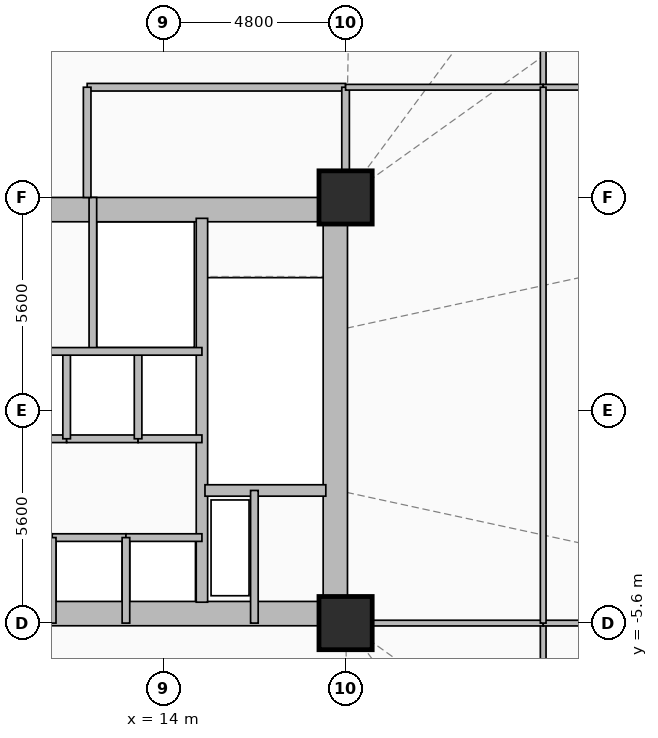
"""IFC4 building model, lengths in metres.
Left out: names, types, materials, properties, quantities, classifications, styles, units other than length and angle.
Written with IfcOpenShell. Run it as: python <this file> out.ifc"""

import sys

from ifc_helpers import new_model, si_unit, direction, frame, frame_2d, origin, origin_2d, place, context, subcontext, project, spatial, rectangle, extrude, element, fill, save


model = new_model("IFC4")
c1 = context("Model", 3, precision=1e-05, world=origin(), true_north=direction((0.0, 1.0)))
c2 = subcontext(c1, "Body", "Model", "MODEL_VIEW")
j1 = project(units=[si_unit("LENGTHUNIT", "METRE"), si_unit("PLANEANGLEUNIT", "RADIAN")], contexts=[c1])
p1 = place(None, origin())
s1 = spatial("IfcSite", under=j1, at=p1, CompositionType="ELEMENT")
p2 = place(p1, origin())
s2 = spatial("IfcBuilding", under=s1, at=p2, CompositionType="ELEMENT")
p3 = place(p2, frame((0.0, 0.0, 22.5)))
s3 = spatial("IfcBuildingStorey", under=s2, at=p3, CompositionType="ELEMENT", Elevation=22.5)
for number, where, z_axis, x_axis in (
    (1, (18.8, -5.6, 0.0), (0.0, 0.0, 1.0), (1.0, 0.0, 0.0)),
    (2, (18.8, 5.6, 0.0), (0.0, 0.0, 1.0), (1.0, 0.0, 0.0)),
):
    element("IfcColumn", number, at=place(p3, frame(where, z_axis=z_axis, x_axis=x_axis)), inside=s3, PredefinedType="COLUMN", context=c2, shape_type="SweptSolid", body=[
        extrude(rectangle(XDim=1.4, YDim=1.4, at=origin_2d()), origin(), (0.0, 0.0, 1.0), 4.5),
    ])
p4 = place(p3, frame((9.2, 5.28, 0.0), z_axis=(0.0, 0.0, 1.0), x_axis=(1.0, 0.0, 0.0)))
e3 = element("IfcWall", 3, at=p4, inside=s3, PredefinedType="SHEAR", context=c2, shape_type="SweptSolid", body=[
    extrude(rectangle(XDim=9.6, YDim=0.64, at=frame_2d((4.8, 0.0))), origin(), (0.0, 0.0, 1.0), 4.16),
])
p5 = place(p4, frame((6.95, 0.0, 0.0)))
e4 = element("IfcOpeningElement", 4, at=p5, cuts=e3, PredefinedType="OPENING", context=c2, shape_type="SweptSolid", body=[
    extrude(rectangle(XDim=1.1, YDim=2.15, at=frame_2d((0.55, 1.075))), frame((0.0, 0.33, 0.0), z_axis=(0.0, -1.0, 0.0), x_axis=(1.0, 0.0, 0.0)), (0.0, 0.0, 1.0), 0.66),
])
p6 = place(p4, frame((3.775, 0.0, 0.0)))
e5 = element("IfcOpeningElement", 5, at=p6, cuts=e3, PredefinedType="OPENING", context=c2, shape_type="SweptSolid", body=[
    extrude(rectangle(XDim=1.05, YDim=2.1, at=frame_2d((0.525, 1.05))), frame((0.0, 0.33, 0.0), z_axis=(0.0, -1.0, 0.0), x_axis=(1.0, 0.0, 0.0)), (0.0, 0.0, 1.0), 0.66),
])
p7 = place(p3, frame((9.2, -5.35, 0.0), z_axis=(0.0, 0.0, 1.0), x_axis=(1.0, 0.0, 0.0)))
e6 = element("IfcWall", 6, at=p7, inside=s3, PredefinedType="SHEAR", context=c2, shape_type="SweptSolid", body=[
    extrude(rectangle(XDim=9.6, YDim=0.64, at=frame_2d((4.8, 0.0))), origin(), (0.0, 0.0, 1.0), 4.16),
])
p8 = place(p7, frame((7.65, 0.0, 0.0)))
e7 = element("IfcOpeningElement", 7, at=p8, cuts=e6, PredefinedType="OPENING", context=c2, shape_type="SweptSolid", body=[
    extrude(rectangle(XDim=0.9, YDim=2.1, at=frame_2d((0.45, 1.05))), frame((0.0, 0.33, 0.0), z_axis=(0.0, -1.0, 0.0), x_axis=(1.0, 0.0, 0.0)), (0.0, 0.0, 1.0), 0.66),
])
p9 = place(p3, frame((18.53, -5.05, 0.0), z_axis=(0.0, 0.0, 1.0), x_axis=(0.0, 1.0, 0.0)))
e8 = element("IfcWall", 8, at=p9, inside=s3, PredefinedType="SHEAR", context=c2, shape_type="SweptSolid", body=[
    extrude(rectangle(XDim=10.1, YDim=0.64, at=frame_2d((5.05, 0.0))), origin(), (0.0, 0.0, 1.0), 4.16),
])
p10 = place(p3, frame((15.02, -5.05, 0.0), z_axis=(0.0, 0.0, 1.0), x_axis=(0.0, 1.0, 0.0)))
e9 = element("IfcWall", 9, at=p10, inside=s3, PredefinedType="SHEAR", context=c2, shape_type="SweptSolid", body=[
    extrude(rectangle(XDim=10.1, YDim=0.3, at=frame_2d((5.05, 0.0))), origin(), (0.0, 0.0, 1.0), 4.16),
])
p11 = place(p3, frame((15.1, -2.11, 0.0), z_axis=(0.0, 0.0, 1.0), x_axis=(1.0, 0.0, 0.0)))
e10 = element("IfcWall", 10, at=p11, inside=s3, PredefinedType="SHEAR", context=c2, shape_type="SweptSolid", body=[
    extrude(rectangle(XDim=3.18, YDim=0.3, at=frame_2d((1.59, 0.0))), origin(), (0.0, 0.0, 1.0), 4.16),
])
p12 = place(p3, frame((16.4, -2.11, 0.0), z_axis=(0.0, 0.0, 1.0), x_axis=(0.0, -1.0, 0.0)))
e11 = element("IfcWall", 11, at=p12, inside=s3, PredefinedType="PARTITIONING", context=c2, shape_type="SweptSolid", body=[
    extrude(rectangle(XDim=3.49, YDim=0.2, at=frame_2d((1.745, 0.0))), origin(), (0.0, 0.0, 1.0), 4.16),
])
p13 = place(p3, frame((12.15, 5.6, 0.0), z_axis=(0.0, 0.0, 1.0), x_axis=(0.0, -1.0, 0.0)))
e12 = element("IfcWall", 12, at=p13, inside=s3, PredefinedType="PARTITIONING", context=c2, shape_type="SweptSolid", body=[
    extrude(rectangle(XDim=4.05, YDim=0.2, at=frame_2d((2.025, 0.0))), origin(), (0.0, 0.0, 1.0), 4.16),
])
p14 = place(p3, frame((18.8, 8.5, 0.0), z_axis=(0.0, 0.0, 1.0), x_axis=(-1.0, 0.0, 0.0)))
e13 = element("IfcWall", 13, at=p14, inside=s3, PredefinedType="PARTITIONING", context=c2, shape_type="SweptSolid", body=[
    extrude(rectangle(XDim=6.8, YDim=0.2, at=frame_2d((3.4, 0.0))), origin(), (0.0, 0.0, 1.0), 4.16),
])
p15 = place(p14, frame((3.985, 0.0, 0.0)))
e14 = element("IfcOpeningElement", 14, at=p15, cuts=e13, PredefinedType="OPENING", context=c2, shape_type="SweptSolid", body=[
    extrude(rectangle(XDim=1.1, YDim=2.15, at=frame_2d((0.55, 1.075))), frame((0.0, 0.11, 0.0), z_axis=(0.0, -1.0, 0.0), x_axis=(1.0, 0.0, 0.0)), (0.0, 0.0, 1.0), 0.22),
])
p16 = place(p3, frame((12.0, 8.5, 0.0), z_axis=(0.0, 0.0, 1.0), x_axis=(0.0, -1.0, 0.0)))
e15 = element("IfcWall", 15, at=p16, inside=s3, PredefinedType="PARTITIONING", context=c2, shape_type="SweptSolid", body=[
    extrude(rectangle(XDim=2.9, YDim=0.2, at=frame_2d((1.45, 0.0))), origin(), (0.0, 0.0, 1.0), 4.16),
])
p17 = place(p3, frame((18.8, 5.6, 0.0), z_axis=(0.0, 0.0, 1.0), x_axis=(0.0, 1.0, 0.0)))
e16 = element("IfcWall", 16, at=p17, inside=s3, PredefinedType="PARTITIONING", context=c2, shape_type="SweptSolid", body=[
    extrude(rectangle(XDim=2.9, YDim=0.2, at=frame_2d((1.45, 0.0))), origin(), (0.0, 0.0, 1.0), 3.645),
])
p18 = place(p3, frame((9.2, -3.35, 0.0), z_axis=(0.0, 0.0, 1.0), x_axis=(1.0, 0.0, 0.0)))
e17 = element("IfcWall", 17, at=p18, inside=s3, PredefinedType="PARTITIONING", context=c2, shape_type="SweptSolid", body=[
    extrude(rectangle(XDim=1.88, YDim=0.2, at=frame_2d((0.94, 0.0))), origin(), (0.0, 0.0, 1.0), 3.875),
])
p19 = place(p3, frame((11.08, -3.35, 0.0), z_axis=(0.0, 0.0, 1.0), x_axis=(1.0, 0.0, 0.0)))
e18 = element("IfcWall", 18, at=p19, inside=s3, PredefinedType="PARTITIONING", context=c2, shape_type="SweptSolid", body=[
    extrude(rectangle(XDim=1.94, YDim=0.2, at=frame_2d((0.97, 0.0))), origin(), (0.0, 0.0, 1.0), 4.16),
])
p20 = place(p3, frame((13.02, -3.35, 0.0), z_axis=(0.0, 0.0, 1.0), x_axis=(1.0, 0.0, 0.0)))
e19 = element("IfcWall", 19, at=p20, inside=s3, PredefinedType="PARTITIONING", context=c2, shape_type="SweptSolid", body=[
    extrude(rectangle(XDim=2.0, YDim=0.2, at=frame_2d((1.0, 0.0))), origin(), (0.0, 0.0, 1.0), 4.16),
])
p21 = place(p3, frame((11.46, -0.75, 0.0), z_axis=(0.0, 0.0, 1.0), x_axis=(-1.0, 0.0, 0.0)))
e20 = element("IfcWall", 20, at=p21, inside=s3, PredefinedType="PARTITIONING", context=c2, shape_type="SweptSolid", body=[
    extrude(rectangle(XDim=2.26, YDim=0.2, at=frame_2d((1.13, 0.0))), origin(), (0.0, 0.0, 1.0), 4.16),
])
p22 = place(p21, frame((0.605, 0.0, 0.0)))
e21 = element("IfcOpeningElement", 21, at=p22, cuts=e20, PredefinedType="OPENING", context=c2, shape_type="SweptSolid", body=[
    extrude(rectangle(XDim=1.05, YDim=2.1, at=frame_2d((0.525, 1.05))), frame((0.0, 0.11, 0.0), z_axis=(0.0, -1.0, 0.0), x_axis=(1.0, 0.0, 0.0)), (0.0, 0.0, 1.0), 0.22),
])
p23 = place(p3, frame((13.34, -0.75, 0.0), z_axis=(0.0, 0.0, 1.0), x_axis=(-1.0, 0.0, 0.0)))
e22 = element("IfcWall", 22, at=p23, inside=s3, PredefinedType="PARTITIONING", context=c2, shape_type="SweptSolid", body=[
    extrude(rectangle(XDim=1.88, YDim=0.2, at=frame_2d((0.94, 0.0))), origin(), (0.0, 0.0, 1.0), 4.16),
])
p24 = place(p23, frame((0.415, 0.0, 0.0)))
e23 = element("IfcOpeningElement", 23, at=p24, cuts=e22, PredefinedType="OPENING", context=c2, shape_type="SweptSolid", body=[
    extrude(rectangle(XDim=1.05, YDim=2.1, at=frame_2d((0.525, 1.05))), frame((0.0, 0.11, 0.0), z_axis=(0.0, -1.0, 0.0), x_axis=(1.0, 0.0, 0.0)), (0.0, 0.0, 1.0), 0.22),
])
p25 = place(p3, frame((15.02, -0.75, 0.0), z_axis=(0.0, 0.0, 1.0), x_axis=(-1.0, 0.0, 0.0)))
e24 = element("IfcWall", 24, at=p25, inside=s3, PredefinedType="PARTITIONING", context=c2, shape_type="SweptSolid", body=[
    extrude(rectangle(XDim=1.68, YDim=0.2, at=frame_2d((0.84, 0.0))), origin(), (0.0, 0.0, 1.0), 4.16),
])
for number, where, z_axis, x_axis in (
    (25, (11.08, -5.6, 0.0), (0.0, 0.0, 1.0), (0.0, 1.0, 0.0)),
    (26, (13.02, -5.6, 0.0), (0.0, 0.0, 1.0), (0.0, 1.0, 0.0)),
):
    element("IfcWall", number, at=place(p3, frame(where, z_axis=z_axis, x_axis=x_axis)), inside=s3, PredefinedType="PARTITIONING", context=c2, shape_type="SweptSolid", body=[
        extrude(rectangle(XDim=2.25, YDim=0.2, at=frame_2d((1.125, 0.0))), origin(), (0.0, 0.0, 1.0), 4.16),
    ])
for number, where, z_axis, x_axis in (
    (27, (11.46, -0.75, 0.0), (0.0, 0.0, 1.0), (0.0, 1.0, 0.0)),
    (28, (13.34, -0.75, 0.0), (0.0, 0.0, 1.0), (0.0, 1.0, 0.0)),
):
    element("IfcWall", number, at=place(p3, frame(where, z_axis=z_axis, x_axis=x_axis)), inside=s3, PredefinedType="PARTITIONING", context=c2, shape_type="SweptSolid", body=[
        extrude(rectangle(XDim=2.3, YDim=0.2, at=frame_2d((1.15, 0.0))), origin(), (0.0, 0.0, 1.0), 4.16),
    ])
p26 = place(p3, frame((24.0, 10.65, 0.0), z_axis=(0.0, 0.0, 1.0), x_axis=(0.0, -1.0, 0.0)))
e29 = element("IfcWall", 29, at=p26, inside=s3, PredefinedType="PARTITIONING", context=c2, shape_type="SweptSolid", body=[
    extrude(rectangle(XDim=2.15, YDim=0.15, at=frame_2d((1.075, 0.0))), origin(), (0.0, 0.0, 1.0), 4.16),
])
p27 = place(p26, frame((0.625, 0.0, 0.0)))
e30 = element("IfcOpeningElement", 30, at=p27, cuts=e29, PredefinedType="OPENING", context=c2, shape_type="SweptSolid", body=[
    extrude(rectangle(XDim=0.9, YDim=2.1, at=frame_2d((0.45, 1.05))), frame((0.0, 0.085, 0.0), z_axis=(0.0, -1.0, 0.0), x_axis=(1.0, 0.0, 0.0)), (0.0, 0.0, 1.0), 0.17),
])
p28 = place(p3, frame((24.0, 8.5, 0.0), z_axis=(0.0, 0.0, 1.0), x_axis=(-1.0, 0.0, 0.0)))
e31 = element("IfcWall", 31, at=p28, inside=s3, PredefinedType="PARTITIONING", context=c2, shape_type="SweptSolid", body=[
    extrude(rectangle(XDim=5.2, YDim=0.15, at=frame_2d((2.6, 0.0))), origin(), (0.0, 0.0, 1.0), 4.16),
])
p29 = place(p28, frame((0.954, 0.0, 0.0)))
e32 = element("IfcOpeningElement", 32, at=p29, cuts=e31, PredefinedType="OPENING", context=c2, shape_type="SweptSolid", body=[
    extrude(rectangle(XDim=1.05, YDim=2.15, at=frame_2d((0.525, 1.075))), frame((0.0, 0.085, 0.0), z_axis=(0.0, -1.0, 0.0), x_axis=(1.0, 0.0, 0.0)), (0.0, 0.0, 1.0), 0.17),
])
p30 = place(p3, frame((24.0, -5.6, 0.0), z_axis=(0.0, 0.0, 1.0), x_axis=(0.0, -1.0, 0.0)))
e33 = element("IfcWall", 33, at=p30, inside=s3, PredefinedType="PARTITIONING", context=c2, shape_type="SweptSolid", body=[
    extrude(rectangle(XDim=2.15, YDim=0.15, at=frame_2d((1.075, 0.0))), origin(), (0.0, 0.0, 1.0), 4.16),
])
p31 = place(p30, frame((0.625, 0.0, 0.0)))
e34 = element("IfcOpeningElement", 34, at=p31, cuts=e33, PredefinedType="OPENING", context=c2, shape_type="SweptSolid", body=[
    extrude(rectangle(XDim=0.9, YDim=2.1, at=frame_2d((0.45, 1.05))), frame((0.0, 0.085, 0.0), z_axis=(0.0, -1.0, 0.0), x_axis=(1.0, 0.0, 0.0)), (0.0, 0.0, 1.0), 0.17),
])
p32 = place(p3, frame((18.8, -5.6, 0.0), z_axis=(0.0, 0.0, 1.0), x_axis=(1.0, 0.0, 0.0)))
e35 = element("IfcWall", 35, at=p32, inside=s3, PredefinedType="PARTITIONING", context=c2, shape_type="SweptSolid", body=[
    extrude(rectangle(XDim=5.2, YDim=0.15, at=frame_2d((2.6, 0.0))), origin(), (0.0, 0.0, 1.0), 4.16),
])
p33 = place(p3, frame((24.0, 8.5, 0.0), z_axis=(0.0, 0.0, 1.0), x_axis=(1.0, 0.0, 0.0)))
e36 = element("IfcWall", 36, at=p33, inside=s3, PredefinedType="PARTITIONING", context=c2, shape_type="SweptSolid", body=[
    extrude(rectangle(XDim=2.65, YDim=0.15, at=frame_2d((1.325, 0.0))), origin(), (0.0, 0.0, 1.0), 4.16),
])
p34 = place(p33, frame((0.965, 0.0, 0.0)))
e37 = element("IfcOpeningElement", 37, at=p34, cuts=e36, PredefinedType="OPENING", context=c2, shape_type="SweptSolid", body=[
    extrude(rectangle(XDim=1.05, YDim=2.15, at=frame_2d((0.525, 1.075))), frame((0.0, 0.085, 0.0), z_axis=(0.0, -1.0, 0.0), x_axis=(1.0, 0.0, 0.0)), (0.0, 0.0, 1.0), 0.17),
])
p35 = place(p3, frame((26.65, -5.6, 0.0), z_axis=(0.0, 0.0, 1.0), x_axis=(-1.0, 0.0, 0.0)))
e38 = element("IfcWall", 38, at=p35, inside=s3, PredefinedType="PARTITIONING", context=c2, shape_type="SweptSolid", body=[
    extrude(rectangle(XDim=2.65, YDim=0.15, at=frame_2d((1.325, 0.0))), origin(), (0.0, 0.0, 1.0), 4.16),
])
p36 = place(p35, frame((0.635, 0.0, 0.0)))
e39 = element("IfcOpeningElement", 39, at=p36, cuts=e38, PredefinedType="OPENING", context=c2, shape_type="SweptSolid", body=[
    extrude(rectangle(XDim=1.05, YDim=2.15, at=frame_2d((0.525, 1.075))), frame((0.0, 0.085, 0.0), z_axis=(0.0, -1.0, 0.0), x_axis=(1.0, 0.0, 0.0)), (0.0, 0.0, 1.0), 0.17),
])
p37 = place(p3, frame((24.0, -5.6, 0.0), z_axis=(0.0, 0.0, 1.0), x_axis=(0.0, 1.0, 0.0)))
e40 = element("IfcWall", 40, at=p37, inside=s3, PredefinedType="PARTITIONING", context=c2, shape_type="SweptSolid", body=[
    extrude(rectangle(XDim=14.1, YDim=0.15, at=frame_2d((7.05, 0.0))), origin(), (0.0, 0.0, 1.0), 4.16),
])
p38 = place(p3, frame((9.2, 1.55, 0.0), z_axis=(0.0, 0.0, 1.0), x_axis=(1.0, 0.0, 0.0)))
e41 = element("IfcWall", 41, at=p38, inside=s3, PredefinedType="PARTITIONING", context=c2, shape_type="SweptSolid", body=[
    extrude(rectangle(XDim=5.82, YDim=0.2, at=frame_2d((2.91, 0.0))), origin(), (0.0, 0.0, 1.0), 4.16),
])
p39 = place(p5, origin())
e42 = element("IfcDoor", 42, at=p39, inside=s3, OperationType="SINGLE_SWING_RIGHT", PredefinedType="DOOR", context=c2, shape_type="SweptSolid", body=[
    extrude(rectangle(XDim=1.1, YDim=2.15, at=frame_2d((0.55, 1.075))), frame((0.0, 0.025, 0.0), z_axis=(0.0, -1.0, 0.0), x_axis=(1.0, 0.0, 0.0)), (0.0, 0.0, 1.0), 0.05),
])
fill(e4, e42)
p40 = place(p6, origin())
e43 = element("IfcDoor", 43, at=p40, inside=s3, OperationType="DOUBLE_DOOR_SLIDING", PredefinedType="DOOR", context=c2, shape_type="SweptSolid", body=[
    extrude(rectangle(XDim=1.05, YDim=2.1, at=frame_2d((0.525, 1.05))), frame((0.0, 0.025, 0.0), z_axis=(0.0, -1.0, 0.0), x_axis=(1.0, 0.0, 0.0)), (0.0, 0.0, 1.0), 0.05),
])
fill(e5, e43)
p41 = place(p8, origin())
e44 = element("IfcDoor", 44, at=p41, inside=s3, OperationType="SINGLE_SWING_RIGHT", PredefinedType="DOOR", context=c2, shape_type="SweptSolid", body=[
    extrude(rectangle(XDim=0.9, YDim=2.1, at=frame_2d((0.45, 1.05))), frame((0.0, 0.025, 0.0), z_axis=(0.0, -1.0, 0.0), x_axis=(1.0, 0.0, 0.0)), (0.0, 0.0, 1.0), 0.05),
])
fill(e7, e44)
p42 = place(p15, origin())
e45 = element("IfcDoor", 45, at=p42, inside=s3, OperationType="SINGLE_SWING_RIGHT", PredefinedType="DOOR", context=c2, shape_type="SweptSolid", body=[
    extrude(rectangle(XDim=1.1, YDim=2.15, at=frame_2d((0.55, 1.075))), frame((0.0, 0.025, 0.0), z_axis=(0.0, -1.0, 0.0), x_axis=(1.0, 0.0, 0.0)), (0.0, 0.0, 1.0), 0.05),
])
fill(e14, e45)
p43 = place(p24, origin())
e46 = element("IfcDoor", 46, at=p43, inside=s3, OperationType="DOUBLE_DOOR_SLIDING", PredefinedType="DOOR", context=c2, shape_type="SweptSolid", body=[
    extrude(rectangle(XDim=1.05, YDim=2.1, at=frame_2d((0.525, 1.05))), frame((0.0, 0.025, 0.0), z_axis=(0.0, -1.0, 0.0), x_axis=(1.0, 0.0, 0.0)), (0.0, 0.0, 1.0), 0.05),
])
fill(e23, e46)
p44 = place(p27, origin())
e47 = element("IfcDoor", 47, at=p44, inside=s3, OperationType="SINGLE_SWING_LEFT", PredefinedType="DOOR", context=c2, shape_type="SweptSolid", body=[
    extrude(rectangle(XDim=0.9, YDim=2.1, at=frame_2d((0.45, 1.05))), frame((0.0, 0.025, 0.0), z_axis=(0.0, -1.0, 0.0), x_axis=(1.0, 0.0, 0.0)), (0.0, 0.0, 1.0), 0.05),
])
fill(e30, e47)
p45 = place(p29, origin())
e48 = element("IfcDoor", 48, at=p45, inside=s3, OperationType="SINGLE_SWING_RIGHT", PredefinedType="DOOR", context=c2, shape_type="SweptSolid", body=[
    extrude(rectangle(XDim=1.05, YDim=2.15, at=frame_2d((0.525, 1.075))), frame((0.0, 0.025, 0.0), z_axis=(0.0, -1.0, 0.0), x_axis=(1.0, 0.0, 0.0)), (0.0, 0.0, 1.0), 0.05),
])
fill(e32, e48)
p46 = place(p31, origin())
e49 = element("IfcDoor", 49, at=p46, inside=s3, OperationType="SINGLE_SWING_RIGHT", PredefinedType="DOOR", context=c2, shape_type="SweptSolid", body=[
    extrude(rectangle(XDim=0.9, YDim=2.1, at=frame_2d((0.45, 1.05))), frame((0.0, 0.025, 0.0), z_axis=(0.0, -1.0, 0.0), x_axis=(1.0, 0.0, 0.0)), (0.0, 0.0, 1.0), 0.05),
])
fill(e34, e49)
save(model, sys.argv[1])
